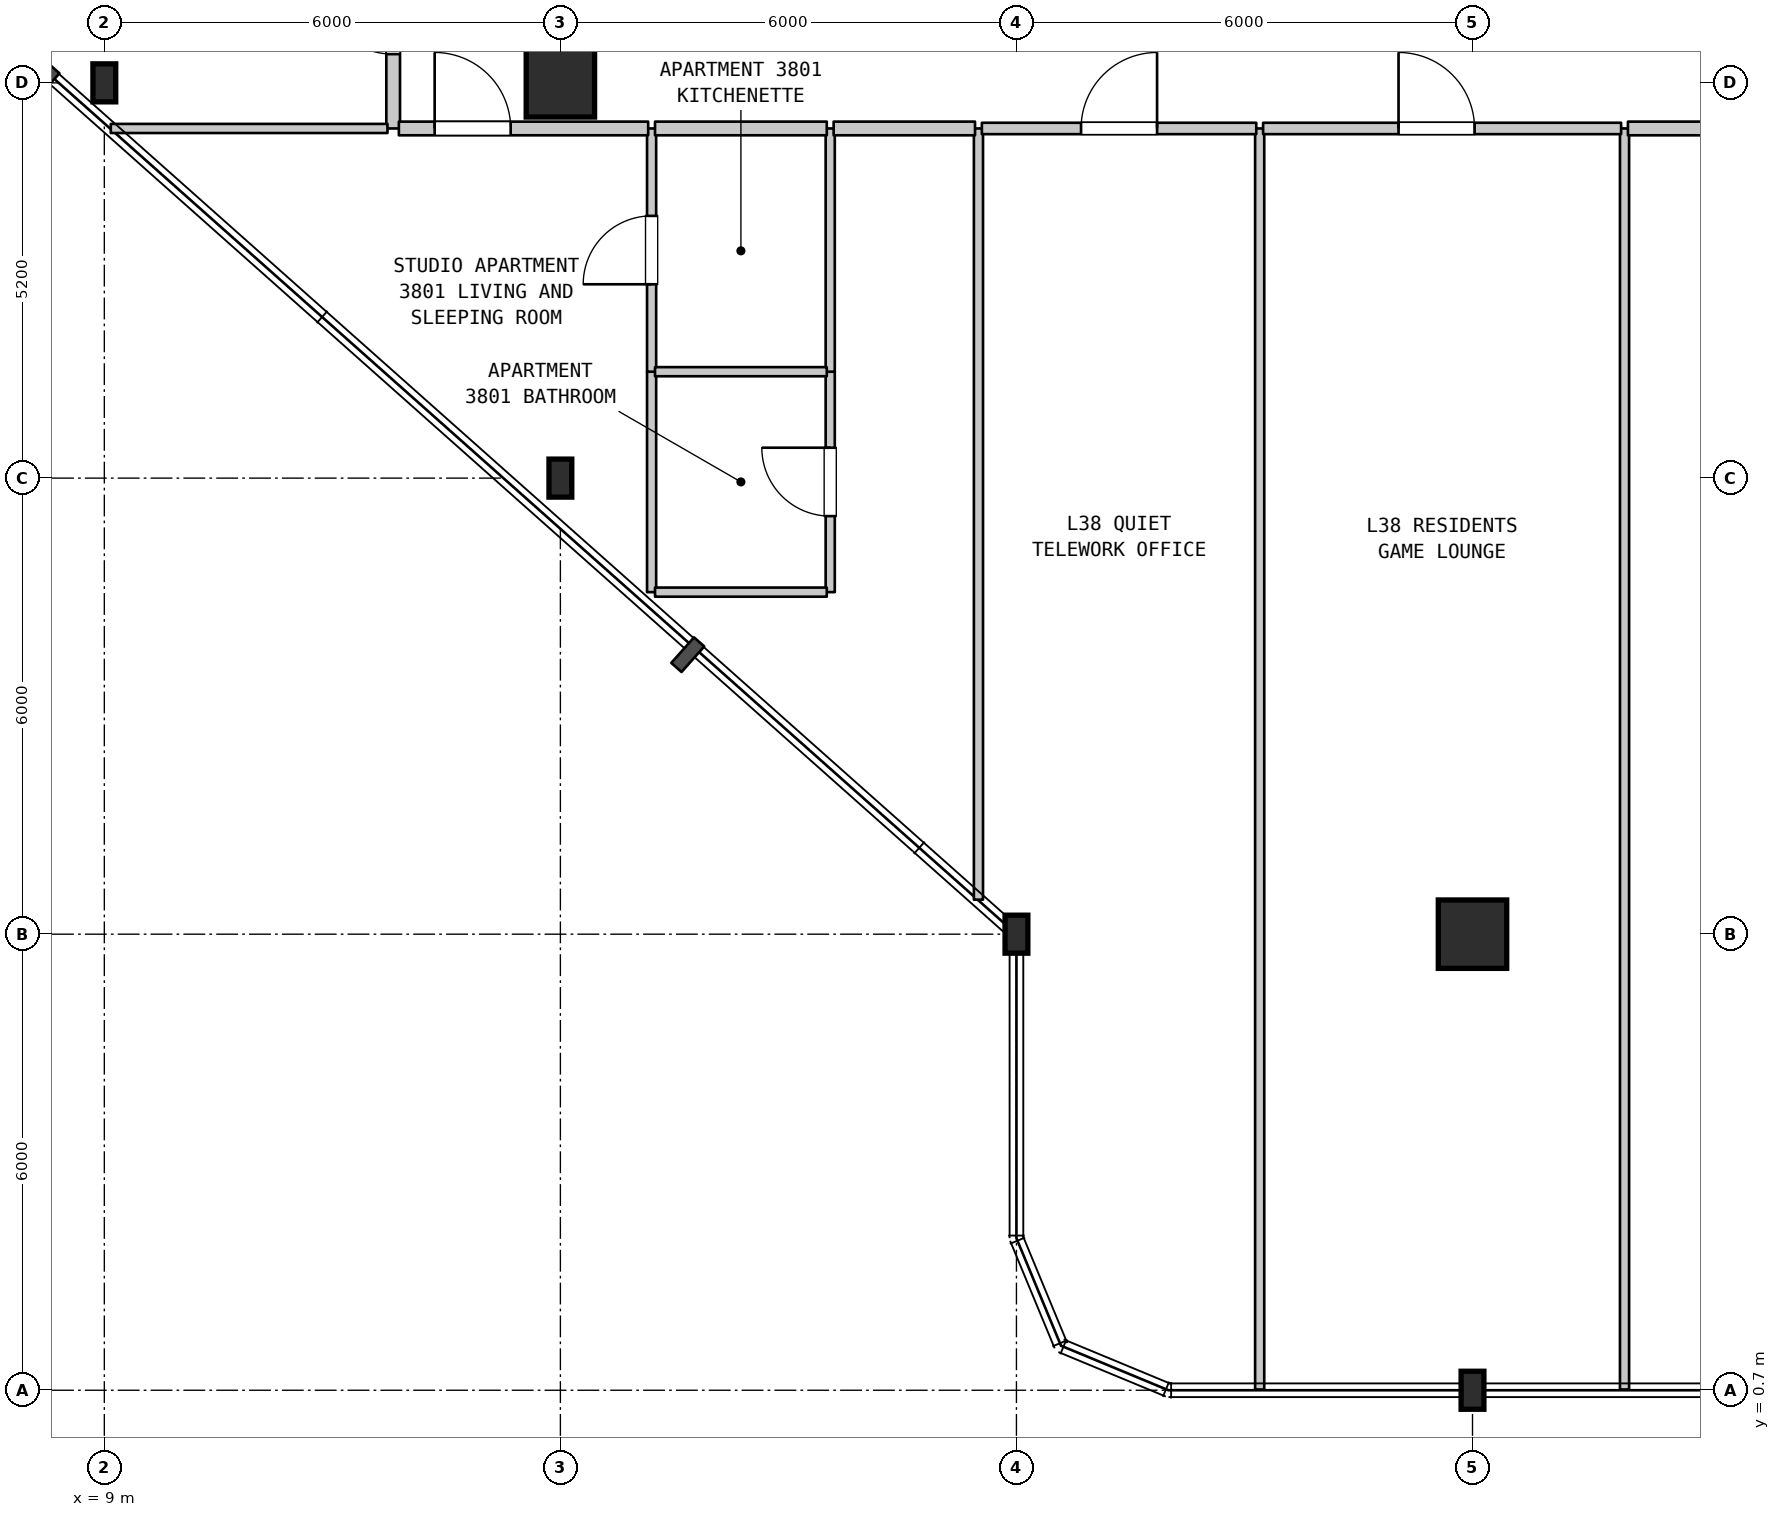
"""IFC4 building model, lengths in metres.
Left out: names, types, materials, properties, quantities, classifications, styles, units other than length and angle.
Written with IfcOpenShell. Run it as: python <this file> out.ifc"""

import sys

from ifc_helpers import new_model, si_unit, direction, frame, frame_2d, origin, origin_2d, place, context, subcontext, project, spatial, rectangle, i_section, extrude, element, fill, save


model = new_model("IFC4")
c1 = context("Model", 3, precision=1e-05, world=origin(), true_north=direction((0.0, 1.0)))
c2 = subcontext(c1, "Body", "Model", "MODEL_VIEW")
j1 = project(units=[si_unit("LENGTHUNIT", "METRE"), si_unit("PLANEANGLEUNIT", "RADIAN")], contexts=[c1])
p1 = place(None, origin())
s1 = spatial("IfcSite", under=j1, at=p1, CompositionType="ELEMENT")
p2 = place(p1, origin())
s2 = spatial("IfcBuilding", under=s1, at=p2, CompositionType="ELEMENT")
p3 = place(p2, frame((0.0, 0.0, 155.7)))
s3 = spatial("IfcBuildingStorey", under=s2, at=p3, CompositionType="ELEMENT", Elevation=155.7)
for number, where, z_axis, x_axis in (
    (1, (9.0, 17.9, 0.0), (0.0, 0.0, 1.0), (1.0, 0.0, 0.0)),
    (2, (15.0, 12.7, 0.0), (0.0, 0.0, 1.0), (1.0, 0.0, 0.0)),
):
    element("IfcColumn", number, at=place(p3, frame(where, z_axis=z_axis, x_axis=x_axis)), inside=s3, PredefinedType="COLUMN", context=c2, shape_type="SweptSolid", body=[
        extrude(i_section(OverallWidth=0.3, OverallDepth=0.5, WebThickness=0.014, FlangeThickness=0.028, FilletRadius=0.027, at=origin_2d()), origin(), (0.0, 0.0, 1.0), 3.7),
    ])
p4 = place(p3, frame((15.0, 17.9, 0.0), z_axis=(0.0, 0.0, 1.0), x_axis=(1.0, 0.0, 0.0)))
e3 = element("IfcColumn", 3, at=p4, inside=s3, PredefinedType="COLUMN", context=c2, shape_type="SweptSolid", body=[
    extrude(rectangle(XDim=0.9, YDim=0.9, at=origin_2d()), origin(), (0.0, 0.0, 1.0), 3.7),
])
for number, where, z_axis, x_axis in (
    (4, (21.0, 6.7, 0.0), (0.0, 0.0, 1.0), (1.0, 0.0, 0.0)),
    (5, (27.0, 0.7, 0.0), (0.0, 0.0, 1.0), (1.0, 0.0, 0.0)),
):
    element("IfcColumn", number, at=place(p3, frame(where, z_axis=z_axis, x_axis=x_axis)), inside=s3, PredefinedType="COLUMN", context=c2, shape_type="SweptSolid", body=[
        extrude(i_section(OverallWidth=0.3, OverallDepth=0.5, WebThickness=0.014, FlangeThickness=0.028, FilletRadius=0.027, at=origin_2d()), origin(), (0.0, 0.0, 1.0), 3.7),
    ])
p5 = place(p3, frame((27.0, 6.7, 0.0), z_axis=(0.0, 0.0, 1.0), x_axis=(1.0, 0.0, 0.0)))
e6 = element("IfcColumn", 6, at=p5, inside=s3, PredefinedType="COLUMN", context=c2, shape_type="SweptSolid", body=[
    extrude(rectangle(XDim=0.9, YDim=0.9, at=origin_2d()), origin(), (0.0, 0.0, 1.0), 3.7),
])
p6 = place(p3, frame((12.8, 17.3, 0.0), z_axis=(0.0, 0.0, 1.0), x_axis=(0.0, 1.0, 0.0)))
e7 = element("IfcWall", 7, at=p6, inside=s3, PredefinedType="STANDARD", context=c2, shape_type="SweptSolid", body=[
    extrude(rectangle(XDim=3.1, YDim=0.18, at=frame_2d((1.55, 0.0))), origin(), (0.0, 0.0, 1.0), 3.28),
])
p7 = place(p6, frame((0.978, 0.0, 0.0)))
e8 = element("IfcOpeningElement", 8, at=p7, cuts=e7, PredefinedType="OPENING", context=c2, shape_type="SweptSolid", body=[
    extrude(rectangle(XDim=1.0, YDim=2.15, at=frame_2d((0.5, 1.075))), frame((0.0, 0.1, 0.0), z_axis=(0.0, -1.0, 0.0), x_axis=(1.0, 0.0, 0.0)), (0.0, 0.0, 1.0), 0.2),
])
p8 = place(p3, frame((16.2, 11.2, 0.0), z_axis=(0.0, 0.0, 1.0), x_axis=(0.0, 1.0, 0.0)))
e9 = element("IfcWall", 9, at=p8, inside=s3, PredefinedType="PARTITIONING", context=c2, shape_type="SweptSolid", body=[
    extrude(rectangle(XDim=2.9, YDim=0.12, at=frame_2d((1.45, 0.0))), origin(), (0.0, 0.0, 1.0), 3.28),
])
p9 = place(p3, frame((16.2, 14.1, 0.0), z_axis=(0.0, 0.0, 1.0), x_axis=(0.0, 1.0, 0.0)))
e10 = element("IfcWall", 10, at=p9, inside=s3, PredefinedType="PARTITIONING", context=c2, shape_type="SweptSolid", body=[
    extrude(rectangle(XDim=3.2, YDim=0.12, at=frame_2d((1.6, 0.0))), origin(), (0.0, 0.0, 1.0), 3.28),
])
p10 = place(p9, frame((1.15, 0.0, 0.0)))
e11 = element("IfcOpeningElement", 11, at=p10, cuts=e10, PredefinedType="OPENING", context=c2, shape_type="SweptSolid", body=[
    extrude(rectangle(XDim=0.9, YDim=2.15, at=frame_2d((0.45, 1.075))), frame((0.0, 0.07, 0.0), z_axis=(0.0, -1.0, 0.0), x_axis=(1.0, 0.0, 0.0)), (0.0, 0.0, 1.0), 0.14),
])
p11 = place(p3, frame((18.55, 11.2, 0.0), z_axis=(0.0, 0.0, 1.0), x_axis=(0.0, 1.0, 0.0)))
e12 = element("IfcWall", 12, at=p11, inside=s3, PredefinedType="PARTITIONING", context=c2, shape_type="SweptSolid", body=[
    extrude(rectangle(XDim=2.9, YDim=0.12, at=frame_2d((1.45, 0.0))), origin(), (0.0, 0.0, 1.0), 3.28),
])
p12 = place(p11, frame((1.0, 0.0, 0.0)))
e13 = element("IfcOpeningElement", 13, at=p12, cuts=e12, PredefinedType="OPENING", context=c2, shape_type="SweptSolid", body=[
    extrude(rectangle(XDim=0.9, YDim=2.1, at=frame_2d((0.45, 1.05))), frame((0.0, 0.07, 0.0), z_axis=(0.0, -1.0, 0.0), x_axis=(1.0, 0.0, 0.0)), (0.0, 0.0, 1.0), 0.14),
])
p13 = place(p3, frame((18.55, 14.1, 0.0), z_axis=(0.0, 0.0, 1.0), x_axis=(0.0, 1.0, 0.0)))
e14 = element("IfcWall", 14, at=p13, inside=s3, PredefinedType="PARTITIONING", context=c2, shape_type="SweptSolid", body=[
    extrude(rectangle(XDim=3.2, YDim=0.12, at=frame_2d((1.6, 0.0))), origin(), (0.0, 0.0, 1.0), 3.28),
])
p14 = place(p3, frame((20.5, 7.154, 0.0), z_axis=(0.0, 0.0, 1.0), x_axis=(0.0, 1.0, 0.0)))
e15 = element("IfcWall", 15, at=p14, inside=s3, PredefinedType="PARTITIONING", context=c2, shape_type="SweptSolid", body=[
    extrude(rectangle(XDim=10.146, YDim=0.12, at=frame_2d((5.073, 0.0))), origin(), (0.0, 0.0, 1.0), 3.28),
])
for number, where, z_axis, x_axis in (
    (16, (24.2, 0.71, 0.0), (0.0, 0.0, 1.0), (0.0, 1.0, 0.0)),
    (17, (29.0, 0.71, 0.0), (0.0, 0.0, 1.0), (0.0, 1.0, 0.0)),
):
    element("IfcWall", number, at=place(p3, frame(where, z_axis=z_axis, x_axis=x_axis)), inside=s3, PredefinedType="PARTITIONING", context=c2, shape_type="SweptSolid", body=[
        extrude(rectangle(XDim=16.59, YDim=0.12, at=frame_2d((8.295, 0.0))), origin(), (0.0, 0.0, 1.0), 3.28),
    ])
for number, where, z_axis, x_axis in (
    (18, (16.245, 11.2, 0.0), (0.0, 0.0, 1.0), (1.0, 0.0, 0.0)),
    (19, (16.245, 14.1, 0.0), (0.0, 0.0, 1.0), (1.0, 0.0, 0.0)),
):
    element("IfcWall", number, at=place(p3, frame(where, z_axis=z_axis, x_axis=x_axis)), inside=s3, PredefinedType="PARTITIONING", context=c2, shape_type="SweptSolid", body=[
        extrude(rectangle(XDim=2.26, YDim=0.12, at=frame_2d((1.13, 0.0))), origin(), (0.0, 0.0, 1.0), 3.28),
    ])
p15 = place(p3, frame((9.085, 17.3, 0.0), z_axis=(0.0, 0.0, 1.0), x_axis=(1.0, 0.0, 0.0)))
e20 = element("IfcWall", 20, at=p15, inside=s3, PredefinedType="PARTITIONING", context=c2, shape_type="SweptSolid", body=[
    extrude(rectangle(XDim=3.64, YDim=0.12, at=frame_2d((1.82, 0.0))), origin(), (0.0, 0.0, 1.0), 3.28),
])
p16 = place(p3, frame((12.875, 17.3, 0.0), z_axis=(0.0, 0.0, 1.0), x_axis=(1.0, 0.0, 0.0)))
e21 = element("IfcWall", 21, at=p16, inside=s3, PredefinedType="STANDARD", context=c2, shape_type="SweptSolid", body=[
    extrude(rectangle(XDim=3.28, YDim=0.18, at=frame_2d((1.64, 0.0))), origin(), (0.0, 0.0, 1.0), 3.28),
])
p17 = place(p16, frame((0.471, 0.0, 0.0)))
e22 = element("IfcOpeningElement", 22, at=p17, cuts=e21, PredefinedType="OPENING", context=c2, shape_type="SweptSolid", body=[
    extrude(rectangle(XDim=1.0, YDim=2.15, at=frame_2d((0.5, 1.075))), frame((0.0, 0.1, 0.0), z_axis=(0.0, -1.0, 0.0), x_axis=(1.0, 0.0, 0.0)), (0.0, 0.0, 1.0), 0.2),
])
p18 = place(p3, frame((16.245, 17.3, 0.0), z_axis=(0.0, 0.0, 1.0), x_axis=(1.0, 0.0, 0.0)))
e23 = element("IfcWall", 23, at=p18, inside=s3, PredefinedType="STANDARD", context=c2, shape_type="SweptSolid", body=[
    extrude(rectangle(XDim=2.26, YDim=0.18, at=frame_2d((1.13, 0.0))), origin(), (0.0, 0.0, 1.0), 3.28),
])
p19 = place(p3, frame((18.595, 17.3, 0.0), z_axis=(0.0, 0.0, 1.0), x_axis=(1.0, 0.0, 0.0)))
e24 = element("IfcWall", 24, at=p19, inside=s3, PredefinedType="STANDARD", context=c2, shape_type="SweptSolid", body=[
    extrude(rectangle(XDim=1.86, YDim=0.18, at=frame_2d((0.93, 0.0))), origin(), (0.0, 0.0, 1.0), 3.28),
])
p20 = place(p3, frame((20.545, 17.3, 0.0), z_axis=(0.0, 0.0, 1.0), x_axis=(1.0, 0.0, 0.0)))
e25 = element("IfcWall", 25, at=p20, inside=s3, PredefinedType="STANDARD", context=c2, shape_type="SweptSolid", body=[
    extrude(rectangle(XDim=3.61, YDim=0.15, at=frame_2d((1.805, 0.0))), origin(), (0.0, 0.0, 1.0), 3.28),
])
p21 = place(p20, frame((1.305, 0.0, 0.0)))
e26 = element("IfcOpeningElement", 26, at=p21, cuts=e25, PredefinedType="OPENING", context=c2, shape_type="SweptSolid", body=[
    extrude(rectangle(XDim=1.0, YDim=2.15, at=frame_2d((0.5, 1.075))), frame((0.0, 0.085, 0.0), z_axis=(0.0, -1.0, 0.0), x_axis=(1.0, 0.0, 0.0)), (0.0, 0.0, 1.0), 0.17),
])
p22 = place(p3, frame((24.245, 17.3, 0.0), z_axis=(0.0, 0.0, 1.0), x_axis=(1.0, 0.0, 0.0)))
e27 = element("IfcWall", 27, at=p22, inside=s3, PredefinedType="STANDARD", context=c2, shape_type="SweptSolid", body=[
    extrude(rectangle(XDim=4.71, YDim=0.15, at=frame_2d((2.355, 0.0))), origin(), (0.0, 0.0, 1.0), 3.28),
])
p23 = place(p22, frame((1.782, 0.0, 0.0)))
e28 = element("IfcOpeningElement", 28, at=p23, cuts=e27, PredefinedType="OPENING", context=c2, shape_type="SweptSolid", body=[
    extrude(rectangle(XDim=1.0, YDim=2.15, at=frame_2d((0.5, 1.075))), frame((0.0, 0.085, 0.0), z_axis=(0.0, -1.0, 0.0), x_axis=(1.0, 0.0, 0.0)), (0.0, 0.0, 1.0), 0.17),
])
p24 = place(p3, frame((29.045, 17.3, 0.0), z_axis=(0.0, 0.0, 1.0), x_axis=(1.0, 0.0, 0.0)))
e29 = element("IfcWall", 29, at=p24, inside=s3, PredefinedType="STANDARD", context=c2, shape_type="SweptSolid", body=[
    extrude(rectangle(XDim=3.96, YDim=0.18, at=frame_2d((1.98, 0.0))), origin(), (0.0, 0.0, 1.0), 3.28),
])
p25 = place(p24, frame((1.48, 0.0, 0.0)))
e30 = element("IfcOpeningElement", 30, at=p25, cuts=e29, PredefinedType="OPENING", context=c2, shape_type="SweptSolid", body=[
    extrude(rectangle(XDim=1.0, YDim=2.15, at=frame_2d((0.5, 1.075))), frame((0.0, 0.1, 0.0), z_axis=(0.0, -1.0, 0.0), x_axis=(1.0, 0.0, 0.0)), (0.0, 0.0, 1.0), 0.2),
])
p26 = place(p7, origin())
e31 = element("IfcDoor", 31, at=p26, inside=s3, OperationType="SINGLE_SWING_RIGHT", PredefinedType="DOOR", context=c2, shape_type="SweptSolid", body=[
    extrude(rectangle(XDim=1.0, YDim=2.15, at=frame_2d((0.5, 1.075))), frame((0.0, 0.025, 0.0), z_axis=(0.0, -1.0, 0.0), x_axis=(1.0, 0.0, 0.0)), (0.0, 0.0, 1.0), 0.05),
])
fill(e8, e31)
p27 = place(p10, origin())
e32 = element("IfcDoor", 32, at=p27, inside=s3, OperationType="SINGLE_SWING_LEFT", PredefinedType="DOOR", context=c2, shape_type="SweptSolid", body=[
    extrude(rectangle(XDim=0.9, YDim=2.15, at=frame_2d((0.45, 1.075))), frame((0.0, 0.025, 0.0), z_axis=(0.0, -1.0, 0.0), x_axis=(1.0, 0.0, 0.0)), (0.0, 0.0, 1.0), 0.05),
])
fill(e11, e32)
p28 = place(p12, origin())
e33 = element("IfcDoor", 33, at=p28, inside=s3, OperationType="SINGLE_SWING_RIGHT", PredefinedType="DOOR", context=c2, shape_type="SweptSolid", body=[
    extrude(rectangle(XDim=0.9, YDim=2.1, at=frame_2d((0.45, 1.05))), frame((0.0, 0.025, 0.0), z_axis=(0.0, -1.0, 0.0), x_axis=(1.0, 0.0, 0.0)), (0.0, 0.0, 1.0), 0.05),
])
fill(e13, e33)
p29 = place(p17, origin())
e34 = element("IfcDoor", 34, at=p29, inside=s3, OperationType="SINGLE_SWING_LEFT", PredefinedType="DOOR", context=c2, shape_type="SweptSolid", body=[
    extrude(rectangle(XDim=1.0, YDim=2.15, at=frame_2d((0.5, 1.075))), frame((0.0, 0.025, 0.0), z_axis=(0.0, -1.0, 0.0), x_axis=(1.0, 0.0, 0.0)), (0.0, 0.0, 1.0), 0.05),
])
fill(e22, e34)
p30 = place(p21, origin())
e35 = element("IfcDoor", 35, at=p30, inside=s3, OperationType="SINGLE_SWING_RIGHT", PredefinedType="DOOR", context=c2, shape_type="SweptSolid", body=[
    extrude(rectangle(XDim=1.0, YDim=2.15, at=frame_2d((0.5, 1.075))), frame((0.0, 0.025, 0.0), z_axis=(0.0, -1.0, 0.0), x_axis=(1.0, 0.0, 0.0)), (0.0, 0.0, 1.0), 0.05),
])
fill(e26, e35)
p31 = place(p23, origin())
e36 = element("IfcDoor", 36, at=p31, inside=s3, OperationType="SINGLE_SWING_LEFT", PredefinedType="DOOR", context=c2, shape_type="SweptSolid", body=[
    extrude(rectangle(XDim=1.0, YDim=2.15, at=frame_2d((0.5, 1.075))), frame((0.0, 0.025, 0.0), z_axis=(0.0, -1.0, 0.0), x_axis=(1.0, 0.0, 0.0)), (0.0, 0.0, 1.0), 0.05),
])
fill(e28, e36)
save(model, sys.argv[1])
